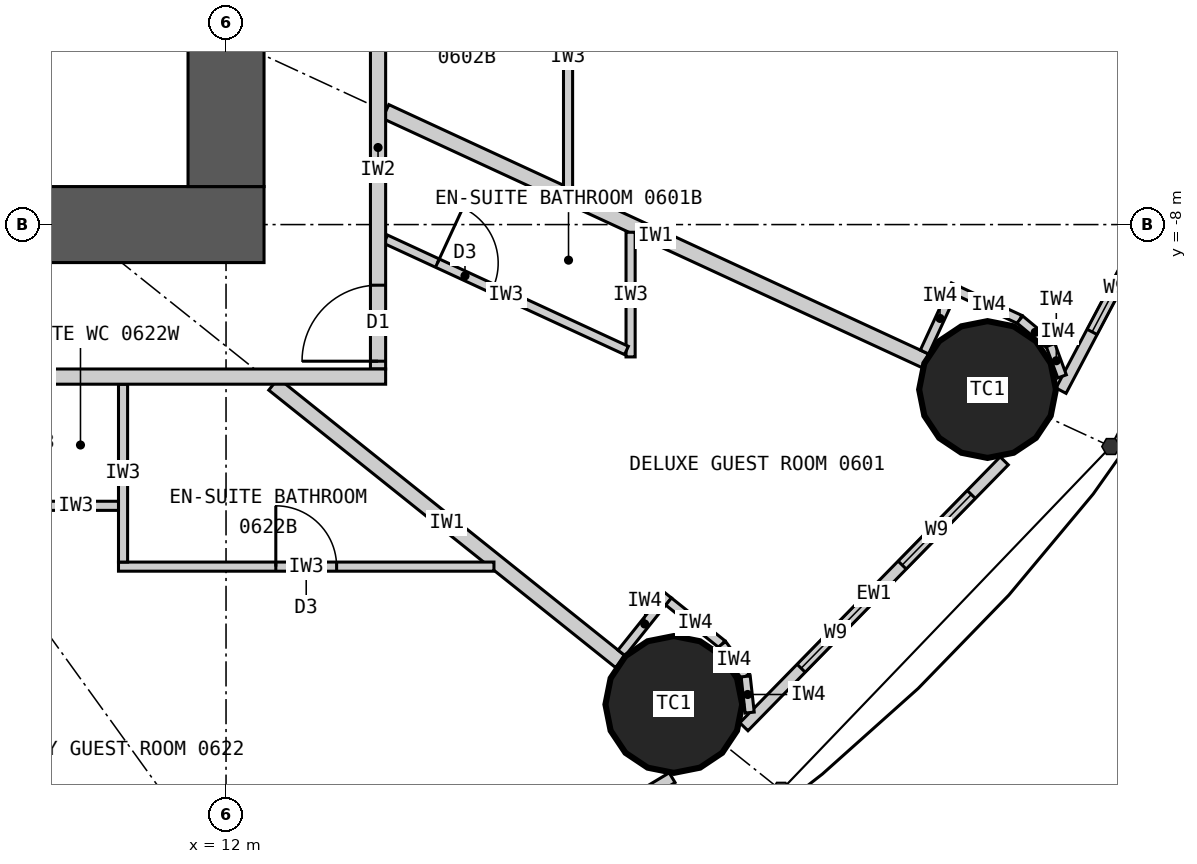
"""IFC4 building model, lengths in metres.
Left out: names, types, materials, properties, quantities, classifications, styles, units other than length and angle.
Written with IfcOpenShell. Run it as: python <this file> out.ifc"""

import sys

from ifc_helpers import new_model, si_unit, direction, frame, frame_2d, origin, origin_2d, place, context, subcontext, project, spatial, rectangle, circle, extrude, element, fill, save


model = new_model("IFC4")
c1 = context("Model", 3, precision=1e-05, world=origin(), true_north=direction((0.0, 1.0)))
c2 = subcontext(c1, "Body", "Model", "MODEL_VIEW")
j1 = project(units=[si_unit("LENGTHUNIT", "METRE"), si_unit("PLANEANGLEUNIT", "RADIAN")], contexts=[c1])
p1 = place(None, origin())
s1 = spatial("IfcSite", under=j1, at=p1, CompositionType="ELEMENT")
p2 = place(p1, origin())
s2 = spatial("IfcBuilding", under=s1, at=p2, CompositionType="ELEMENT")
p3 = place(p2, frame((0.0, 0.0, 32.7)))
s3 = spatial("IfcBuildingStorey", under=s2, at=p3, CompositionType="ELEMENT", Elevation=32.7)
for number, where, z_axis, x_axis in (
    (1, (17.892, -14.313, 0.0), (0.0, 0.0, 1.0), (1.0, 0.0, 0.0)),
    (2, (22.019, -10.17, 0.0), (0.0, 0.0, 1.0), (1.0, 0.0, 0.0)),
):
    element("IfcColumn", number, at=place(p3, frame(where, z_axis=z_axis, x_axis=x_axis)), inside=s3, PredefinedType="COLUMN", context=c2, shape_type="SweptSolid", body=[
        extrude(circle(Radius=0.9, at=origin_2d()), origin(), (0.0, 0.0, 1.0), 3.3),
    ])
p4 = place(p3, frame((12.5, -8.0, 0.0), z_axis=(0.0, 0.0, 1.0), x_axis=(-1.0, 0.0, 0.0)))
e3 = element("IfcWall", 3, at=p4, inside=s3, PredefinedType="SHEAR", context=c2, shape_type="SweptSolid", body=[
    extrude(rectangle(XDim=25.0, YDim=1.0, at=frame_2d((12.5, 0.0))), origin(), (0.0, 0.0, 1.0), 3.3),
])
p5 = place(p4, frame((11.2, 0.0, 0.0)))
e4 = element("IfcOpeningElement", 4, at=p5, cuts=e3, PredefinedType="OPENING", context=c2, shape_type="SweptSolid", body=[
    extrude(rectangle(XDim=1.2, YDim=2.2, at=frame_2d((0.6, 1.1))), frame((0.0, 0.51, 0.0), z_axis=(0.0, -1.0, 0.0), x_axis=(1.0, 0.0, 0.0)), (0.0, 0.0, 1.0), 1.02),
])
p6 = place(p4, frame((18.8, 0.0, 0.0)))
e5 = element("IfcOpeningElement", 5, at=p6, cuts=e3, PredefinedType="OPENING", context=c2, shape_type="SweptSolid", body=[
    extrude(rectangle(XDim=0.9, YDim=2.2, at=frame_2d((0.45, 1.1))), frame((0.0, 0.51, 0.0), z_axis=(0.0, -1.0, 0.0), x_axis=(1.0, 0.0, 0.0)), (0.0, 0.0, 1.0), 1.02),
])
p7 = place(p3, frame((12.0, -7.5, 0.0), z_axis=(0.0, 0.0, 1.0), x_axis=(0.0, 1.0, 0.0)))
e6 = element("IfcWall", 6, at=p7, inside=s3, PredefinedType="SHEAR", context=c2, shape_type="SweptSolid", body=[
    extrude(rectangle(XDim=15.0, YDim=1.0, at=frame_2d((7.5, 0.0))), origin(), (0.0, 0.0, 1.0), 3.3),
])
p8 = place(p7, frame((6.6, 0.0, 0.0)))
e7 = element("IfcOpeningElement", 7, at=p8, cuts=e6, PredefinedType="OPENING", context=c2, shape_type="SweptSolid", body=[
    extrude(rectangle(XDim=1.8, YDim=2.2, at=frame_2d((0.9, 1.1))), frame((0.0, 0.51, 0.0), z_axis=(0.0, -1.0, 0.0), x_axis=(1.0, 0.0, 0.0)), (0.0, 0.0, 1.0), 1.02),
])
p9 = place(p3, frame((13.412, -17.957, 0.0), z_axis=(0.0, 0.0, 1.0), x_axis=(0.856958191554, 0.515385931054, 0.0)))
e8 = element("IfcWall", 8, at=p9, inside=s3, PredefinedType="ELEMENTEDWALL", context=c2, shape_type="SweptSolid", body=[
    extrude(rectangle(XDim=5.201, YDim=0.15, at=frame_2d((2.601, 0.0))), origin(), (0.0, 0.0, 1.0), 3.12),
])
p10 = place(p9, frame((1.225, 0.0, 0.9)))
e9 = element("IfcOpeningElement", 9, at=p10, cuts=e8, PredefinedType="OPENING", context=c2, shape_type="SweptSolid", body=[
    extrude(rectangle(XDim=1.3, YDim=1.9, at=frame_2d((0.65, 0.95))), frame((0.0, 0.085, 0.0), z_axis=(0.0, -1.0, 0.0), x_axis=(1.0, 0.0, 0.0)), (0.0, 0.0, 1.0), 0.17),
])
p11 = place(p9, frame((3.125, 0.0, 0.9)))
e10 = element("IfcOpeningElement", 10, at=p11, cuts=e8, PredefinedType="OPENING", context=c2, shape_type="SweptSolid", body=[
    extrude(rectangle(XDim=1.3, YDim=1.9, at=frame_2d((0.65, 0.95))), frame((0.0, 0.085, 0.0), z_axis=(0.0, -1.0, 0.0), x_axis=(1.0, 0.0, 0.0)), (0.0, 0.0, 1.0), 0.17),
])
p12 = place(p3, frame((18.813, -14.607, 0.0), z_axis=(0.0, 0.0, 1.0), x_axis=(0.699612594083, 0.714522370679, 0.0)))
e11 = element("IfcWall", 11, at=p12, inside=s3, PredefinedType="ELEMENTEDWALL", context=c2, shape_type="SweptSolid", body=[
    extrude(rectangle(XDim=4.896, YDim=0.15, at=frame_2d((2.448, 0.0))), origin(), (0.0, 0.0, 1.0), 3.12),
])
p13 = place(p12, frame((1.077, 0.0, 0.9)))
e12 = element("IfcOpeningElement", 12, at=p13, cuts=e11, PredefinedType="OPENING", context=c2, shape_type="SweptSolid", body=[
    extrude(rectangle(XDim=1.3, YDim=1.9, at=frame_2d((0.65, 0.95))), frame((0.0, 0.085, 0.0), z_axis=(0.0, -1.0, 0.0), x_axis=(1.0, 0.0, 0.0)), (0.0, 0.0, 1.0), 0.17),
])
p14 = place(p12, frame((2.977, 0.0, 0.9)))
e13 = element("IfcOpeningElement", 13, at=p14, cuts=e11, PredefinedType="OPENING", context=c2, shape_type="SweptSolid", body=[
    extrude(rectangle(XDim=1.3, YDim=1.9, at=frame_2d((0.65, 0.95))), frame((0.0, 0.085, 0.0), z_axis=(0.0, -1.0, 0.0), x_axis=(1.0, 0.0, 0.0)), (0.0, 0.0, 1.0), 0.17),
])
p15 = place(p3, frame((22.986, -10.185, 0.0), z_axis=(0.0, 0.0, 1.0), x_axis=(0.467303182954, 0.884097129959, 0.0)))
e14 = element("IfcWall", 14, at=p15, inside=s3, PredefinedType="ELEMENTEDWALL", context=c2, shape_type="SweptSolid", body=[
    extrude(rectangle(XDim=4.606, YDim=0.15, at=frame_2d((2.303, 0.0))), origin(), (0.0, 0.0, 1.0), 3.12),
])
p16 = place(p15, frame((0.875, 0.0, 0.9)))
e15 = element("IfcOpeningElement", 15, at=p16, cuts=e14, PredefinedType="OPENING", context=c2, shape_type="SweptSolid", body=[
    extrude(rectangle(XDim=1.3, YDim=1.9, at=frame_2d((0.65, 0.95))), frame((0.0, 0.085, 0.0), z_axis=(0.0, -1.0, 0.0), x_axis=(1.0, 0.0, 0.0)), (0.0, 0.0, 1.0), 0.17),
])
p17 = place(p15, frame((2.775, 0.0, 0.9)))
e16 = element("IfcOpeningElement", 16, at=p17, cuts=e14, PredefinedType="OPENING", context=c2, shape_type="SweptSolid", body=[
    extrude(rectangle(XDim=1.3, YDim=1.9, at=frame_2d((0.65, 0.95))), frame((0.0, 0.085, 0.0), z_axis=(0.0, -1.0, 0.0), x_axis=(1.0, 0.0, 0.0)), (0.0, 0.0, 1.0), 0.17),
])
p18 = place(p3, frame((5.239, -10.1, 0.0), z_axis=(0.0, 0.0, 1.0), x_axis=(0.460422783389, -0.887699758103, 0.0)))
e17 = element("IfcWall", 17, at=p18, inside=s3, PredefinedType="PARTITIONING", context=c2, shape_type="SweptSolid", body=[
    extrude(rectangle(XDim=10.12, YDim=0.2, at=frame_2d((5.06, 0.0))), origin(), (0.0, 0.0, 1.0), 3.12),
])
p19 = place(p3, frame((12.625, -10.1, 0.0), z_axis=(0.0, 0.0, 1.0), x_axis=(0.780872884676, -0.624689953479, 0.0)))
e18 = element("IfcWall", 18, at=p19, inside=s3, PredefinedType="PARTITIONING", context=c2, shape_type="SweptSolid", body=[
    extrude(rectangle(XDim=5.845, YDim=0.2, at=frame_2d((2.922, 0.0))), origin(), (0.0, 0.0, 1.0), 2.32),
])
p20 = place(p3, frame((14.1, -6.512, 0.0), z_axis=(0.0, 0.0, 1.0), x_axis=(0.907842433118, -0.41931147925, 0.0)))
e19 = element("IfcWall", 19, at=p20, inside=s3, PredefinedType="PARTITIONING", context=c2, shape_type="SweptSolid", body=[
    extrude(rectangle(XDim=7.823, YDim=0.2, at=frame_2d((3.912, 0.0))), origin(), (0.0, 0.0, 1.0), 2.32),
])
p21 = place(p3, frame((17.323, -8.101, 0.0), z_axis=(0.0, 0.0, 1.0), x_axis=(0.0, -1.0, 0.0)))
e20 = element("IfcWall", 20, at=p21, inside=s3, PredefinedType="PARTITIONING", context=c2, shape_type="SweptSolid", body=[
    extrude(rectangle(XDim=1.64, YDim=0.12, at=frame_2d((0.82, 0.0))), origin(), (0.0, 0.0, 1.0), 3.12),
])
p22 = place(p3, frame((14.1, -8.193, 0.0), z_axis=(0.0, 0.0, 1.0), x_axis=(0.907836493557, -0.419324338628, 0.0)))
e21 = element("IfcWall", 21, at=p22, inside=s3, PredefinedType="PARTITIONING", context=c2, shape_type="SweptSolid", body=[
    extrude(rectangle(XDim=3.49, YDim=0.12, at=frame_2d((1.745, 0.0))), origin(), (0.0, 0.0, 1.0), 3.12),
])
p23 = place(p22, frame((0.75, 0.0, 0.0)))
e22 = element("IfcOpeningElement", 22, at=p23, cuts=e21, PredefinedType="OPENING", context=c2, shape_type="SweptSolid", body=[
    extrude(rectangle(XDim=0.8, YDim=2.1, at=frame_2d((0.4, 1.05))), frame((0.0, 0.07, 0.0), z_axis=(0.0, -1.0, 0.0), x_axis=(1.0, 0.0, 0.0)), (0.0, 0.0, 1.0), 0.14),
])
p24 = place(p3, frame((16.5, -7.521, 0.0), z_axis=(0.0, 0.0, 1.0), x_axis=(0.0, 1.0, 0.0)))
e23 = element("IfcWall", 23, at=p24, inside=s3, PredefinedType="PARTITIONING", context=c2, shape_type="SweptSolid", body=[
    extrude(rectangle(XDim=3.448, YDim=0.12, at=frame_2d((1.724, 0.0))), origin(), (0.0, 0.0, 1.0), 3.12),
])
p25 = place(p3, frame((15.525, -12.5, 0.0), z_axis=(0.0, 0.0, 1.0), x_axis=(-1.0, 0.0, 0.0)))
e24 = element("IfcWall", 24, at=p25, inside=s3, PredefinedType="PARTITIONING", context=c2, shape_type="SweptSolid", body=[
    extrude(rectangle(XDim=4.94, YDim=0.12, at=frame_2d((2.47, 0.0))), origin(), (0.0, 0.0, 1.0), 3.12),
])
p26 = place(p25, frame((2.07, 0.0, 0.0)))
e25 = element("IfcOpeningElement", 25, at=p26, cuts=e24, PredefinedType="OPENING", context=c2, shape_type="SweptSolid", body=[
    extrude(rectangle(XDim=0.8, YDim=2.1, at=frame_2d((0.4, 1.05))), frame((0.0, 0.07, 0.0), z_axis=(0.0, -1.0, 0.0), x_axis=(1.0, 0.0, 0.0)), (0.0, 0.0, 1.0), 0.14),
])
p27 = place(p3, frame((10.645, -10.1, 0.0), z_axis=(0.0, 0.0, 1.0), x_axis=(0.0, -1.0, 0.0)))
e26 = element("IfcWall", 26, at=p27, inside=s3, PredefinedType="PARTITIONING", context=c2, shape_type="SweptSolid", body=[
    extrude(rectangle(XDim=2.34, YDim=0.12, at=frame_2d((1.17, 0.0))), origin(), (0.0, 0.0, 1.0), 3.12),
])
p28 = place(p3, frame((10.585, -11.7, 0.0), z_axis=(0.0, 0.0, 1.0), x_axis=(-1.0, 0.0, 0.0)))
e27 = element("IfcWall", 27, at=p28, inside=s3, PredefinedType="PARTITIONING", context=c2, shape_type="SweptSolid", body=[
    extrude(rectangle(XDim=1.12, YDim=0.12, at=frame_2d((0.56, 0.0))), origin(), (0.0, 0.0, 1.0), 3.12),
])
p29 = place(p3, frame((14.0, -9.9, 0.0), z_axis=(0.0, 0.0, 1.0), x_axis=(0.0, 1.0, 0.0)))
e28 = element("IfcWall", 28, at=p29, inside=s3, PredefinedType="PARTITIONING", context=c2, shape_type="SweptSolid", body=[
    extrude(rectangle(XDim=5.827, YDim=0.2, at=frame_2d((2.914, 0.0))), origin(), (0.0, 0.0, 1.0), 3.12),
])
p30 = place(p29, frame((0.103, 0.0, 0.0)))
e29 = element("IfcOpeningElement", 29, at=p30, cuts=e28, PredefinedType="OPENING", context=c2, shape_type="SweptSolid", body=[
    extrude(rectangle(XDim=1.0, YDim=2.2, at=frame_2d((0.5, 1.1))), frame((0.0, 0.11, 0.0), z_axis=(0.0, -1.0, 0.0), x_axis=(1.0, 0.0, 0.0)), (0.0, 0.0, 1.0), 0.22),
])
p31 = place(p3, frame((14.1, -10.0, 0.0), z_axis=(0.0, 0.0, 1.0), x_axis=(-1.0, 0.0, 0.0)))
e30 = element("IfcWall", 30, at=p31, inside=s3, PredefinedType="PARTITIONING", context=c2, shape_type="SweptSolid", body=[
    extrude(rectangle(XDim=9.205, YDim=0.2, at=frame_2d((4.603, 0.0))), origin(), (0.0, 0.0, 1.0), 3.12),
])
p32 = place(p31, frame((4.755, 0.0, 0.0)))
e31 = element("IfcOpeningElement", 31, at=p32, cuts=e30, PredefinedType="OPENING", context=c2, shape_type="SweptSolid", body=[
    extrude(rectangle(XDim=1.0, YDim=2.2, at=frame_2d((0.5, 1.1))), frame((0.0, 0.11, 0.0), z_axis=(0.0, -1.0, 0.0), x_axis=(1.0, 0.0, 0.0)), (0.0, 0.0, 1.0), 0.22),
])
p33 = place(p3, frame((17.205, -13.635, 0.0), z_axis=(0.0, 0.0, 1.0), x_axis=(0.624756144097, 0.780819928289, 0.0)))
e32 = element("IfcWall", 32, at=p33, inside=s3, PredefinedType="PARTITIONING", context=c2, shape_type="SweptSolid", body=[
    extrude(rectangle(XDim=0.975, YDim=0.12, at=frame_2d((0.487, 0.0))), origin(), (0.0, 0.0, 1.0), 3.12),
])
p34 = place(p3, frame((17.823, -12.959, 0.0), z_axis=(0.0, 0.0, 1.0), x_axis=(0.780895271023, -0.624661969144, 0.0)))
e33 = element("IfcWall", 33, at=p34, inside=s3, PredefinedType="PARTITIONING", context=c2, shape_type="SweptSolid", body=[
    extrude(rectangle(XDim=0.9, YDim=0.12, at=frame_2d((0.45, 0.0))), origin(), (0.0, 0.0, 1.0), 3.12),
])
p35 = place(p3, frame((18.526, -13.521, 0.0), z_axis=(0.0, 0.0, 1.0), x_axis=(0.592532503205, -0.805546542818, 0.0)))
e34 = element("IfcWall", 34, at=p35, inside=s3, PredefinedType="PARTITIONING", context=c2, shape_type="SweptSolid", body=[
    extrude(rectangle(XDim=0.525, YDim=0.12, at=frame_2d((0.262, 0.0))), origin(), (0.0, 0.0, 1.0), 3.12),
])
p36 = place(p3, frame((18.837, -13.944, 0.0), z_axis=(0.0, 0.0, 1.0), x_axis=(0.110543348478, -0.993871303594, 0.0)))
e35 = element("IfcWall", 35, at=p36, inside=s3, PredefinedType="PARTITIONING", context=c2, shape_type="SweptSolid", body=[
    extrude(rectangle(XDim=0.479, YDim=0.12, at=frame_2d((0.24, 0.0))), origin(), (0.0, 0.0, 1.0), 3.12),
])
p37 = place(p3, frame((21.189, -9.677, 0.0), z_axis=(0.0, 0.0, 1.0), x_axis=(0.419344098106, 0.907827366509, 0.0)))
e36 = element("IfcWall", 36, at=p37, inside=s3, PredefinedType="PARTITIONING", context=c2, shape_type="SweptSolid", body=[
    extrude(rectangle(XDim=0.975, YDim=0.12, at=frame_2d((0.487, 0.0))), origin(), (0.0, 0.0, 1.0), 3.12),
])
p38 = place(p3, frame((21.627, -8.872, 0.0), z_axis=(0.0, 0.0, 1.0), x_axis=(0.907935564339, -0.419109783957, 0.0)))
e37 = element("IfcWall", 37, at=p38, inside=s3, PredefinedType="PARTITIONING", context=c2, shape_type="SweptSolid", body=[
    extrude(rectangle(XDim=0.9, YDim=0.12, at=frame_2d((0.45, 0.0))), origin(), (0.0, 0.0, 1.0), 3.12),
])
p39 = place(p3, frame((22.445, -9.249, 0.0), z_axis=(0.0, 0.0, 1.0), x_axis=(0.768335565584, -0.640047231584, 0.0)))
e38 = element("IfcWall", 38, at=p39, inside=s3, PredefinedType="PARTITIONING", context=c2, shape_type="SweptSolid", body=[
    extrude(rectangle(XDim=0.525, YDim=0.12, at=frame_2d((0.263, 0.0))), origin(), (0.0, 0.0, 1.0), 3.12),
])
p40 = place(p3, frame((22.848, -9.585, 0.0), z_axis=(0.0, 0.0, 1.0), x_axis=(0.345267312673, -0.938504386138, 0.0)))
e39 = element("IfcWall", 39, at=p40, inside=s3, PredefinedType="PARTITIONING", context=c2, shape_type="SweptSolid", body=[
    extrude(rectangle(XDim=0.439, YDim=0.12, at=frame_2d((0.22, 0.0))), origin(), (0.0, 0.0, 1.0), 3.12),
])
p41 = place(p13, origin())
e40 = element("IfcWindow", 40, at=p41, inside=s3, PartitioningType="SINGLE_PANEL", PredefinedType="WINDOW", context=c2, shape_type="SweptSolid", body=[
    extrude(rectangle(XDim=1.3, YDim=1.9, at=frame_2d((0.65, 0.95))), frame((0.0, 0.03, 0.0), z_axis=(0.0, -1.0, 0.0), x_axis=(1.0, 0.0, 0.0)), (0.0, 0.0, 1.0), 0.06),
])
fill(e12, e40)
p42 = place(p14, origin())
e41 = element("IfcWindow", 41, at=p42, inside=s3, PartitioningType="SINGLE_PANEL", PredefinedType="WINDOW", context=c2, shape_type="SweptSolid", body=[
    extrude(rectangle(XDim=1.3, YDim=1.9, at=frame_2d((0.65, 0.95))), frame((0.0, 0.03, 0.0), z_axis=(0.0, -1.0, 0.0), x_axis=(1.0, 0.0, 0.0)), (0.0, 0.0, 1.0), 0.06),
])
fill(e13, e41)
p43 = place(p16, origin())
e42 = element("IfcWindow", 42, at=p43, inside=s3, PartitioningType="SINGLE_PANEL", PredefinedType="WINDOW", context=c2, shape_type="SweptSolid", body=[
    extrude(rectangle(XDim=1.3, YDim=1.9, at=frame_2d((0.65, 0.95))), frame((0.0, 0.03, 0.0), z_axis=(0.0, -1.0, 0.0), x_axis=(1.0, 0.0, 0.0)), (0.0, 0.0, 1.0), 0.06),
])
fill(e15, e42)
p44 = place(p23, origin())
e43 = element("IfcDoor", 43, at=p44, inside=s3, OperationType="SINGLE_SWING_LEFT", PredefinedType="DOOR", context=c2, shape_type="SweptSolid", body=[
    extrude(rectangle(XDim=0.8, YDim=2.1, at=frame_2d((0.4, 1.05))), frame((0.0, 0.025, 0.0), z_axis=(0.0, -1.0, 0.0), x_axis=(1.0, 0.0, 0.0)), (0.0, 0.0, 1.0), 0.05),
])
fill(e22, e43)
p45 = place(p30, origin())
e44 = element("IfcDoor", 44, at=p45, inside=s3, OperationType="SINGLE_SWING_LEFT", PredefinedType="DOOR", context=c2, shape_type="SweptSolid", body=[
    extrude(rectangle(XDim=1.0, YDim=2.2, at=frame_2d((0.5, 1.1))), frame((0.0, 0.025, 0.0), z_axis=(0.0, -1.0, 0.0), x_axis=(1.0, 0.0, 0.0)), (0.0, 0.0, 1.0), 0.05),
])
fill(e29, e44)
p46 = place(p26, origin())
e45 = element("IfcDoor", 45, at=p46, inside=s3, OperationType="SINGLE_SWING_RIGHT", PredefinedType="DOOR", context=c2, shape_type="SweptSolid", body=[
    extrude(rectangle(XDim=0.8, YDim=2.1, at=frame_2d((0.4, 1.05))), frame((0.0, 0.025, 0.0), z_axis=(0.0, -1.0, 0.0), x_axis=(1.0, 0.0, 0.0)), (0.0, 0.0, 1.0), 0.05),
])
fill(e25, e45)
save(model, sys.argv[1])
